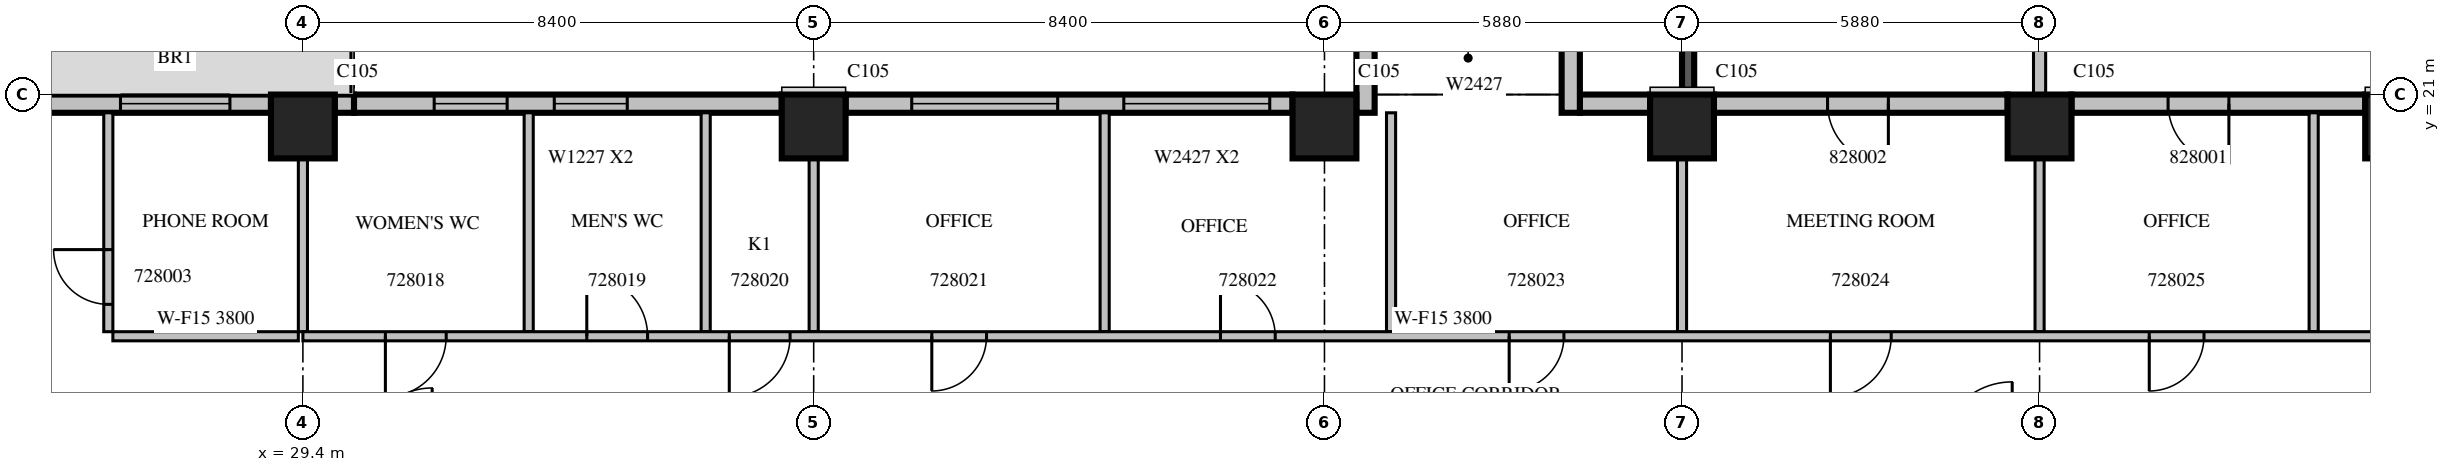
"""IFC4 building model, lengths in metres.
Left out: names, types, materials, properties, quantities, classifications, styles, units other than length and angle.
Written with IfcOpenShell. Run it as: python <this file> out.ifc"""

import sys

from ifc_helpers import new_model, si_unit, direction, frame, frame_2d, origin, origin_2d, place, context, subcontext, project, spatial, rectangle, extrude, source, transform, mapped, element, fill, save


model = new_model("IFC4")
c1 = context("Model", 3, precision=1e-05, world=origin(), true_north=direction((0.0, 1.0)))
c2 = subcontext(c1, "Body", "Model", "MODEL_VIEW")
j1 = project(units=[si_unit("LENGTHUNIT", "METRE"), si_unit("PLANEANGLEUNIT", "RADIAN")], contexts=[c1])
p1 = place(None, origin())
s1 = spatial("IfcSite", under=j1, at=p1, CompositionType="ELEMENT")
p2 = place(p1, origin())
s2 = spatial("IfcBuilding", under=s1, at=p2, CompositionType="ELEMENT")
p3 = place(p2, frame((0.0, 0.0, 128.7)))
s3 = spatial("IfcBuildingStorey", under=s2, at=p3, CompositionType="ELEMENT", Elevation=128.7)
m1 = source(origin(), c2, "Body", "SweptSolid", [
    extrude(rectangle(XDim=1.05, YDim=1.05, at=origin_2d()), origin(), (0.0, 0.0, 1.0), 4.2),
])
for number, where, z_axis, x_axis in (
    (1, (29.4, 20.475, 0.0), (0.0, 0.0, 1.0), (1.0, 0.0, 0.0)),
    (2, (37.8, 20.475, 0.0), (0.0, 0.0, 1.0), (1.0, 0.0, 0.0)),
    (3, (46.2, 20.475, 0.0), (0.0, 0.0, 1.0), (1.0, 0.0, 0.0)),
    (4, (52.08, 20.475, 0.0), (0.0, 0.0, 1.0), (1.0, 0.0, 0.0)),
    (5, (57.96, 20.475, 0.0), (0.0, 0.0, 1.0), (1.0, 0.0, 0.0)),
    (6, (63.84, 20.475, 0.0), (0.0, 0.0, 1.0), (1.0, 0.0, 0.0)),
):
    element("IfcColumn", number, at=place(p3, frame(where, z_axis=z_axis, x_axis=x_axis)), inside=s3, PredefinedType="COLUMN", context=c2, shape_type="MappedRepresentation", body=[
        mapped(m1, transform((0.0, 0.0, 0.0), scale=1.0)),
    ])
m2 = source(origin(), c2, "Body", "SweptSolid", [
    extrude(rectangle(XDim=3.9, YDim=0.2, at=frame_2d((1.95, 0.0))), origin(), (0.0, 0.0, 1.0), 3.79),
])
p4 = place(p3, frame((57.96, 21.0, 0.0), z_axis=(0.0, 0.0, 1.0), x_axis=(0.0, 1.0, 0.0)))
e7 = element("IfcWall", 7, at=p4, inside=s3, PredefinedType="SOLIDWALL", context=c2, shape_type="MappedRepresentation", body=[
    mapped(m2, transform((0.0, 0.0, 0.0), scale=1.0)),
])
m3 = source(origin(), c2, "Body", "SweptSolid", [
    extrude(rectangle(XDim=3.9, YDim=0.2, at=frame_2d((1.95, 0.0))), origin(), (0.0, 0.0, 1.0), 3.79),
])
p5 = place(p3, frame((52.18, 21.0, 0.0), z_axis=(0.0, 0.0, 1.0), x_axis=(0.0, 1.0, 0.0)))
e8 = element("IfcWall", 8, at=p5, inside=s3, PredefinedType="SOLIDWALL", context=c2, shape_type="MappedRepresentation", body=[
    mapped(m3, transform((0.0, 0.0, 0.0), scale=1.0)),
])
m4 = source(origin(), c2, "Body", "SweptSolid", [
    extrude(rectangle(XDim=2.4, YDim=2.7, at=frame_2d((1.2, 1.35))), frame((0.0, 0.11, 0.0), z_axis=(0.0, -1.0, 0.0), x_axis=(1.0, 0.0, 0.0)), (0.0, 0.0, 1.0), 0.22),
])
p6 = place(p5, frame((0.75, 0.0, 0.6)))
e9 = element("IfcOpeningElement", 9, at=p6, cuts=e8, PredefinedType="OPENING", context=c2, shape_type="MappedRepresentation", body=[
    mapped(m4, transform((0.0, 0.0, 0.0), scale=1.0)),
])
m5 = source(origin(), c2, "Body", "SweptSolid", [
    extrude(rectangle(XDim=4.83, YDim=0.3, at=frame_2d((2.415, 0.0))), origin(), (0.0, 0.0, 1.0), 3.8),
])
p7 = place(p3, frame((63.315, 20.85, 0.0), z_axis=(0.0, 0.0, 1.0), x_axis=(-1.0, 0.0, 0.0)))
e10 = element("IfcWall", 10, at=p7, inside=s3, PredefinedType="STANDARD", context=c2, shape_type="MappedRepresentation", body=[
    mapped(m5, transform((0.0, 0.0, 0.0), scale=1.0)),
])
m6 = source(origin(), c2, "Body", "SweptSolid", [
    extrude(rectangle(XDim=1.0, YDim=2.1, at=frame_2d((0.5, 1.05))), frame((0.0, 0.16, 0.0), z_axis=(0.0, -1.0, 0.0), x_axis=(1.0, 0.0, 0.0)), (0.0, 0.0, 1.0), 0.32),
])
p8 = place(p7, frame((2.242, 0.0, 0.0)))
e11 = element("IfcOpeningElement", 11, at=p8, cuts=e10, PredefinedType="OPENING", context=c2, shape_type="MappedRepresentation", body=[
    mapped(m6, transform((0.0, 0.0, 0.0), scale=1.0)),
])
p9 = place(p3, frame((57.435, 20.85, 0.0), z_axis=(0.0, 0.0, 1.0), x_axis=(-1.0, 0.0, 0.0)))
e12 = element("IfcWall", 12, at=p9, inside=s3, PredefinedType="STANDARD", context=c2, shape_type="MappedRepresentation", body=[
    mapped(m5, transform((0.0, 0.0, 0.0), scale=1.0)),
])
p10 = place(p9, frame((1.962, 0.0, 0.0)))
e13 = element("IfcOpeningElement", 13, at=p10, cuts=e12, PredefinedType="OPENING", context=c2, shape_type="MappedRepresentation", body=[
    mapped(m6, transform((0.0, 0.0, 0.0), scale=1.0)),
])
m7 = source(origin(), c2, "Body", "SweptSolid", [
    extrude(rectangle(XDim=1.155, YDim=0.3, at=frame_2d((0.578, 0.0))), origin(), (0.0, 0.0, 1.0), 3.8),
])
p11 = place(p3, frame((51.555, 20.85, 0.0), z_axis=(0.0, 0.0, 1.0), x_axis=(-1.0, 0.0, 0.0)))
e14 = element("IfcWall", 14, at=p11, inside=s3, PredefinedType="STANDARD", context=c2, shape_type="MappedRepresentation", body=[
    mapped(m7, transform((0.0, 0.0, 0.0), scale=1.0)),
])
m8 = source(origin(), c2, "Body", "SweptSolid", [
    extrude(rectangle(XDim=1.2, YDim=0.3, at=frame_2d((0.6, 0.0))), origin(), (0.0, 0.0, 1.0), 3.8),
])
for number, where, z_axis, x_axis in (
    (15, (50.25, 20.7, 0.0), (0.0, 0.0, 1.0), (0.0, 1.0, 0.0)),
    (16, (46.875, 20.7, 0.0), (0.0, 0.0, 1.0), (0.0, 1.0, 0.0)),
):
    element("IfcWall", number, at=place(p3, frame(where, z_axis=z_axis, x_axis=x_axis)), inside=s3, PredefinedType="STANDARD", context=c2, shape_type="MappedRepresentation", body=[
        mapped(m8, transform((0.0, 0.0, 0.0), scale=1.0)),
    ])
m9 = source(origin(), c2, "Body", "SweptSolid", [
    extrude(rectangle(XDim=7.35, YDim=0.3, at=frame_2d((3.675, 0.0))), origin(), (0.0, 0.0, 1.0), 3.8),
])
p12 = place(p3, frame((45.675, 20.85, 0.0), z_axis=(0.0, 0.0, 1.0), x_axis=(-1.0, 0.0, 0.0)))
e17 = element("IfcWall", 17, at=p12, inside=s3, PredefinedType="STANDARD", context=c2, shape_type="MappedRepresentation", body=[
    mapped(m9, transform((0.0, 0.0, 0.0), scale=1.0)),
])
m10 = source(origin(), c2, "Body", "SweptSolid", [
    extrude(rectangle(XDim=2.4, YDim=2.7, at=frame_2d((1.2, 1.35))), frame((0.0, 0.16, 0.0), z_axis=(0.0, -1.0, 0.0), x_axis=(1.0, 0.0, 0.0)), (0.0, 0.0, 1.0), 0.32),
])
p13 = place(p12, frame((0.375, 0.0, 0.6)))
e18 = element("IfcOpeningElement", 18, at=p13, cuts=e17, PredefinedType="OPENING", context=c2, shape_type="MappedRepresentation", body=[
    mapped(m10, transform((0.0, 0.0, 0.0), scale=1.0)),
])
p14 = place(p12, frame((3.862, 0.0, 0.6)))
e19 = element("IfcOpeningElement", 19, at=p14, cuts=e17, PredefinedType="OPENING", context=c2, shape_type="MappedRepresentation", body=[
    mapped(m10, transform((0.0, 0.0, 0.0), scale=1.0)),
])
m11 = source(origin(), c2, "Body", "SweptSolid", [
    extrude(rectangle(XDim=7.035, YDim=0.3, at=frame_2d((3.518, 0.0))), origin(), (0.0, 0.0, 1.0), 3.8),
])
p15 = place(p3, frame((37.275, 20.85, 0.0), z_axis=(0.0, 0.0, 1.0), x_axis=(-1.0, 0.0, 0.0)))
e20 = element("IfcWall", 20, at=p15, inside=s3, PredefinedType="STANDARD", context=c2, shape_type="MappedRepresentation", body=[
    mapped(m11, transform((0.0, 0.0, 0.0), scale=1.0)),
])
m12 = source(origin(), c2, "Body", "SweptSolid", [
    extrude(rectangle(XDim=1.2, YDim=2.7, at=frame_2d((0.6, 1.35))), frame((0.0, 0.16, 0.0), z_axis=(0.0, -1.0, 0.0), x_axis=(1.0, 0.0, 0.0)), (0.0, 0.0, 1.0), 0.32),
])
p16 = place(p15, frame((2.541, 0.0, 0.6)))
e21 = element("IfcOpeningElement", 21, at=p16, cuts=e20, PredefinedType="OPENING", context=c2, shape_type="MappedRepresentation", body=[
    mapped(m12, transform((0.0, 0.0, 0.0), scale=1.0)),
])
p17 = place(p15, frame((4.516, 0.0, 0.6)))
e22 = element("IfcOpeningElement", 22, at=p17, cuts=e20, PredefinedType="OPENING", context=c2, shape_type="MappedRepresentation", body=[
    mapped(m12, transform((0.0, 0.0, 0.0), scale=1.0)),
])
p18 = place(p3, frame((30.24, 20.85, 0.0), z_axis=(0.0, 0.0, 1.0), x_axis=(-1.0, 0.0, 0.0)))
e23 = element("IfcWall", 23, at=p18, inside=s3, PredefinedType="STANDARD", context=c2, shape_type="SweptSolid", body=[
    extrude(rectangle(XDim=0.315, YDim=0.3, at=frame_2d((0.158, 0.0))), origin(), (0.0, 0.0, 1.0), 3.8),
])
p19 = place(p3, frame((28.875, 20.85, 0.0), z_axis=(0.0, 0.0, 1.0), x_axis=(-1.0, 0.0, 0.0)))
e24 = element("IfcWall", 24, at=p19, inside=s3, PredefinedType="STANDARD", context=c2, shape_type="SweptSolid", body=[
    extrude(rectangle(XDim=4.515, YDim=0.3, at=frame_2d((2.257, 0.0))), origin(), (0.0, 0.0, 1.0), 3.8),
])
m13 = source(origin(), c2, "Body", "SweptSolid", [
    extrude(rectangle(XDim=1.8, YDim=2.4, at=frame_2d((0.9, 1.2))), frame((0.0, 0.16, 0.0), z_axis=(0.0, -1.0, 0.0), x_axis=(1.0, 0.0, 0.0)), (0.0, 0.0, 1.0), 0.32),
])
p20 = place(p19, frame((0.675, 0.0, 0.0)))
e25 = element("IfcOpeningElement", 25, at=p20, cuts=e24, PredefinedType="OPENING", context=c2, shape_type="MappedRepresentation", body=[
    mapped(m13, transform((0.0, 0.0, 0.0), scale=1.0)),
])
m14 = source(origin(), c2, "Body", "SweptSolid", [
    extrude(rectangle(XDim=3.6, YDim=0.15, at=frame_2d((1.8, 0.0))), origin(), (0.0, 0.0, 1.0), 3.8),
])
p21 = place(p3, frame((26.2, 20.7, 0.0), z_axis=(0.0, 0.0, 1.0), x_axis=(0.0, -1.0, 0.0)))
e26 = element("IfcWall", 26, at=p21, inside=s3, PredefinedType="PARTITIONING", context=c2, shape_type="MappedRepresentation", body=[
    mapped(m14, transform((0.0, 0.0, 0.0), scale=1.0)),
])
m15 = source(origin(), c2, "Body", "SweptSolid", [
    extrude(rectangle(XDim=0.9, YDim=2.1, at=frame_2d((0.45, 1.05))), frame((0.0, 0.085, 0.0), z_axis=(0.0, -1.0, 0.0), x_axis=(1.0, 0.0, 0.0)), (0.0, 0.0, 1.0), 0.17),
])
p22 = place(p21, frame((2.25, 0.0, 0.0)))
e27 = element("IfcOpeningElement", 27, at=p22, cuts=e26, PredefinedType="OPENING", context=c2, shape_type="MappedRepresentation", body=[
    mapped(m15, transform((0.0, 0.0, 0.0), scale=1.0)),
])
m16 = source(origin(), c2, "Body", "SweptSolid", [
    extrude(rectangle(XDim=3.05, YDim=0.15, at=frame_2d((1.525, 0.0))), origin(), (0.0, 0.0, 1.0), 3.8),
])
p23 = place(p3, frame((26.275, 17.025, 0.0), z_axis=(0.0, 0.0, 1.0), x_axis=(1.0, 0.0, 0.0)))
e28 = element("IfcWall", 28, at=p23, inside=s3, PredefinedType="PARTITIONING", context=c2, shape_type="MappedRepresentation", body=[
    mapped(m16, transform((0.0, 0.0, 0.0), scale=1.0)),
])
m17 = source(origin(), c2, "Body", "SweptSolid", [
    extrude(rectangle(XDim=2.851, YDim=0.15, at=frame_2d((1.425, 0.0))), origin(), (0.0, 0.0, 1.0), 3.8),
])
p24 = place(p3, frame((29.4, 17.1, 0.0), z_axis=(0.0, 0.0, 1.0), x_axis=(0.0, 1.0, 0.0)))
e29 = element("IfcWall", 29, at=p24, inside=s3, PredefinedType="PARTITIONING", context=c2, shape_type="MappedRepresentation", body=[
    mapped(m17, transform((0.0, 0.0, 0.0), scale=1.0)),
])
for number, where, z_axis, x_axis in (
    (30, (33.113, 20.7, 0.0), (0.0, 0.0, 1.0), (0.0, -1.0, 0.0)),
    (31, (36.024, 20.7, 0.0), (0.0, 0.0, 1.0), (0.0, -1.0, 0.0)),
    (32, (42.585, 20.7, 0.0), (0.0, 0.0, 1.0), (0.0, -1.0, 0.0)),
    (33, (47.295, 20.7, 0.0), (0.0, 0.0, 1.0), (0.0, -1.0, 0.0)),
    (34, (62.468, 20.7, 0.0), (0.0, 0.0, 1.0), (0.0, -1.0, 0.0)),
):
    element("IfcWall", number, at=place(p3, frame(where, z_axis=z_axis, x_axis=x_axis)), inside=s3, PredefinedType="PARTITIONING", context=c2, shape_type="MappedRepresentation", body=[
        mapped(m14, transform((0.0, 0.0, 0.0), scale=1.0)),
    ])
for number, where, z_axis, x_axis in (
    (35, (37.8, 17.1, 0.0), (0.0, 0.0, 1.0), (0.0, 1.0, 0.0)),
    (36, (52.08, 17.1, 0.0), (0.0, 0.0, 1.0), (0.0, 1.0, 0.0)),
    (37, (57.96, 17.1, 0.0), (0.0, 0.0, 1.0), (0.0, 1.0, 0.0)),
):
    element("IfcWall", number, at=place(p3, frame(where, z_axis=z_axis, x_axis=x_axis)), inside=s3, PredefinedType="PARTITIONING", context=c2, shape_type="MappedRepresentation", body=[
        mapped(m17, transform((0.0, 0.0, 0.0), scale=1.0)),
    ])
m18 = source(origin(), c2, "Body", "SweptSolid", [
    extrude(rectangle(XDim=37.5, YDim=0.15, at=frame_2d((18.75, 0.0))), origin(), (0.0, 0.0, 1.0), 3.8),
])
p25 = place(p3, frame((29.4, 17.025, 0.0), z_axis=(0.0, 0.0, 1.0), x_axis=(1.0, 0.0, 0.0)))
e38 = element("IfcWall", 38, at=p25, inside=s3, PredefinedType="PARTITIONING", context=c2, shape_type="MappedRepresentation", body=[
    mapped(m18, transform((0.0, 0.0, 0.0), scale=1.0)),
])
m19 = source(origin(), c2, "Body", "SweptSolid", [
    extrude(rectangle(XDim=1.0, YDim=2.1, at=frame_2d((0.5, 1.05))), frame((0.0, 0.085, 0.0), z_axis=(0.0, -1.0, 0.0), x_axis=(1.0, 0.0, 0.0)), (0.0, 0.0, 1.0), 0.17),
])
p26 = place(p25, frame((1.357, 0.0, 0.0)))
e39 = element("IfcOpeningElement", 39, at=p26, cuts=e38, PredefinedType="OPENING", context=c2, shape_type="MappedRepresentation", body=[
    mapped(m19, transform((0.0, 0.0, 0.0), scale=1.0)),
])
p27 = place(p25, frame((4.669, 0.0, 0.0)))
e40 = element("IfcOpeningElement", 40, at=p27, cuts=e38, PredefinedType="OPENING", context=c2, shape_type="MappedRepresentation", body=[
    mapped(m19, transform((0.0, 0.0, 0.0), scale=1.0)),
])
p28 = place(p25, frame((7.012, 0.0, 0.0)))
e41 = element("IfcOpeningElement", 41, at=p28, cuts=e38, PredefinedType="OPENING", context=c2, shape_type="MappedRepresentation", body=[
    mapped(m19, transform((0.0, 0.0, 0.0), scale=1.0)),
])
p29 = place(p25, frame((10.342, 0.0, 0.0)))
e42 = element("IfcOpeningElement", 42, at=p29, cuts=e38, PredefinedType="OPENING", context=c2, shape_type="MappedRepresentation", body=[
    mapped(m15, transform((0.0, 0.0, 0.0), scale=1.0)),
])
p30 = place(p25, frame((15.09, 0.0, 0.0)))
e43 = element("IfcOpeningElement", 43, at=p30, cuts=e38, PredefinedType="OPENING", context=c2, shape_type="MappedRepresentation", body=[
    mapped(m15, transform((0.0, 0.0, 0.0), scale=1.0)),
])
p31 = place(p25, frame((19.837, 0.0, 0.0)))
e44 = element("IfcOpeningElement", 44, at=p31, cuts=e38, PredefinedType="OPENING", context=c2, shape_type="MappedRepresentation", body=[
    mapped(m15, transform((0.0, 0.0, 0.0), scale=1.0)),
])
p32 = place(p25, frame((25.12, 0.0, 0.0)))
e45 = element("IfcOpeningElement", 45, at=p32, cuts=e38, PredefinedType="OPENING", context=c2, shape_type="MappedRepresentation", body=[
    mapped(m19, transform((0.0, 0.0, 0.0), scale=1.0)),
])
p33 = place(p25, frame((30.364, 0.0, 0.0)))
e46 = element("IfcOpeningElement", 46, at=p33, cuts=e38, PredefinedType="OPENING", context=c2, shape_type="MappedRepresentation", body=[
    mapped(m15, transform((0.0, 0.0, 0.0), scale=1.0)),
])
p34 = place(p25, frame((34.871, 0.0, 0.0)))
e47 = element("IfcOpeningElement", 47, at=p34, cuts=e38, PredefinedType="OPENING", context=c2, shape_type="MappedRepresentation", body=[
    mapped(m15, transform((0.0, 0.0, 0.0), scale=1.0)),
])
m20 = source(origin(), c2, "Body", "SweptSolid", [
    extrude(rectangle(XDim=2.4, YDim=2.7, at=frame_2d((1.2, 1.35))), frame((0.0, 0.03, 0.0), z_axis=(0.0, -1.0, 0.0), x_axis=(1.0, 0.0, 0.0)), (0.0, 0.0, 1.0), 0.06),
])
p35 = place(p13, origin())
e48 = element("IfcWindow", 48, at=p35, inside=s3, PartitioningType="SINGLE_PANEL", PredefinedType="WINDOW", context=c2, shape_type="MappedRepresentation", body=[
    mapped(m20, transform((0.0, 0.0, 0.0), scale=1.0)),
])
fill(e18, e48)
m21 = source(origin(), c2, "Body", "SweptSolid", [
    extrude(rectangle(XDim=1.2, YDim=2.7, at=frame_2d((0.6, 1.35))), frame((0.0, 0.03, 0.0), z_axis=(0.0, -1.0, 0.0), x_axis=(1.0, 0.0, 0.0)), (0.0, 0.0, 1.0), 0.06),
])
p36 = place(p16, origin())
e49 = element("IfcWindow", 49, at=p36, inside=s3, PartitioningType="SINGLE_PANEL", PredefinedType="WINDOW", context=c2, shape_type="MappedRepresentation", body=[
    mapped(m21, transform((0.0, 0.0, 0.0), scale=1.0)),
])
fill(e21, e49)
p37 = place(p17, origin())
e50 = element("IfcWindow", 50, at=p37, inside=s3, PartitioningType="SINGLE_PANEL", PredefinedType="WINDOW", context=c2, shape_type="MappedRepresentation", body=[
    mapped(m21, transform((0.0, 0.0, 0.0), scale=1.0)),
])
fill(e22, e50)
p38 = place(p14, origin())
e51 = element("IfcWindow", 51, at=p38, inside=s3, PartitioningType="SINGLE_PANEL", PredefinedType="WINDOW", context=c2, shape_type="MappedRepresentation", body=[
    mapped(m20, transform((0.0, 0.0, 0.0), scale=1.0)),
])
fill(e19, e51)
m22 = source(origin(), c2, "Body", "SweptSolid", [
    extrude(rectangle(XDim=1.8, YDim=2.4, at=frame_2d((0.9, 1.2))), frame((0.0, 0.025, 0.0), z_axis=(0.0, -1.0, 0.0), x_axis=(1.0, 0.0, 0.0)), (0.0, 0.0, 1.0), 0.05),
])
p39 = place(p20, origin())
e52 = element("IfcDoor", 52, at=p39, inside=s3, OperationType="SLIDING_TO_LEFT", PredefinedType="DOOR", context=c2, shape_type="MappedRepresentation", body=[
    mapped(m22, transform((0.0, 0.0, 0.0), scale=1.0)),
])
fill(e25, e52)
m23 = source(origin(), c2, "Body", "SweptSolid", [
    extrude(rectangle(XDim=0.9, YDim=2.1, at=frame_2d((0.45, 1.05))), frame((0.0, 0.025, 0.0), z_axis=(0.0, -1.0, 0.0), x_axis=(1.0, 0.0, 0.0)), (0.0, 0.0, 1.0), 0.05),
])
p40 = place(p22, origin())
e53 = element("IfcDoor", 53, at=p40, inside=s3, OperationType="SINGLE_SWING_RIGHT", PredefinedType="DOOR", context=c2, shape_type="MappedRepresentation", body=[
    mapped(m23, transform((0.0, 0.0, 0.0), scale=1.0)),
])
fill(e27, e53)
m24 = source(origin(), c2, "Body", "SweptSolid", [
    extrude(rectangle(XDim=1.0, YDim=2.1, at=frame_2d((0.5, 1.05))), frame((0.0, 0.025, 0.0), z_axis=(0.0, -1.0, 0.0), x_axis=(1.0, 0.0, 0.0)), (0.0, 0.0, 1.0), 0.05),
])
p41 = place(p26, origin())
e54 = element("IfcDoor", 54, at=p41, inside=s3, OperationType="SINGLE_SWING_RIGHT", PredefinedType="DOOR", context=c2, shape_type="MappedRepresentation", body=[
    mapped(m24, transform((0.0, 0.0, 0.0), scale=1.0)),
])
fill(e39, e54)
p42 = place(p27, origin())
e55 = element("IfcDoor", 55, at=p42, inside=s3, OperationType="SINGLE_SWING_LEFT", PredefinedType="DOOR", context=c2, shape_type="MappedRepresentation", body=[
    mapped(m24, transform((0.0, 0.0, 0.0), scale=1.0)),
])
fill(e40, e55)
p43 = place(p28, origin())
e56 = element("IfcDoor", 56, at=p43, inside=s3, OperationType="SINGLE_SWING_RIGHT", PredefinedType="DOOR", context=c2, shape_type="MappedRepresentation", body=[
    mapped(m24, transform((0.0, 0.0, 0.0), scale=1.0)),
])
fill(e41, e56)
p44 = place(p29, origin())
e57 = element("IfcDoor", 57, at=p44, inside=s3, OperationType="SINGLE_SWING_RIGHT", PredefinedType="DOOR", context=c2, shape_type="MappedRepresentation", body=[
    mapped(m23, transform((0.0, 0.0, 0.0), scale=1.0)),
])
fill(e42, e57)
p45 = place(p30, origin())
e58 = element("IfcDoor", 58, at=p45, inside=s3, OperationType="SINGLE_SWING_LEFT", PredefinedType="DOOR", context=c2, shape_type="MappedRepresentation", body=[
    mapped(m23, transform((0.0, 0.0, 0.0), scale=1.0)),
])
fill(e43, e58)
p46 = place(p31, origin())
e59 = element("IfcDoor", 59, at=p46, inside=s3, OperationType="SINGLE_SWING_RIGHT", PredefinedType="DOOR", context=c2, shape_type="MappedRepresentation", body=[
    mapped(m23, transform((0.0, 0.0, 0.0), scale=1.0)),
])
fill(e44, e59)
p47 = place(p32, origin())
e60 = element("IfcDoor", 60, at=p47, inside=s3, OperationType="SINGLE_SWING_RIGHT", PredefinedType="DOOR", context=c2, shape_type="MappedRepresentation", body=[
    mapped(m24, transform((0.0, 0.0, 0.0), scale=1.0)),
])
fill(e45, e60)
p48 = place(p33, origin())
e61 = element("IfcDoor", 61, at=p48, inside=s3, OperationType="SINGLE_SWING_RIGHT", PredefinedType="DOOR", context=c2, shape_type="MappedRepresentation", body=[
    mapped(m23, transform((0.0, 0.0, 0.0), scale=1.0)),
])
fill(e46, e61)
p49 = place(p8, origin())
e62 = element("IfcDoor", 62, at=p49, inside=s3, OperationType="SINGLE_SWING_LEFT", PredefinedType="DOOR", context=c2, shape_type="MappedRepresentation", body=[
    mapped(m24, transform((0.0, 0.0, 0.0), scale=1.0)),
])
fill(e11, e62)
p50 = place(p10, origin())
e63 = element("IfcDoor", 63, at=p50, inside=s3, OperationType="SINGLE_SWING_LEFT", PredefinedType="DOOR", context=c2, shape_type="MappedRepresentation", body=[
    mapped(m24, transform((0.0, 0.0, 0.0), scale=1.0)),
])
fill(e13, e63)
save(model, sys.argv[1])
